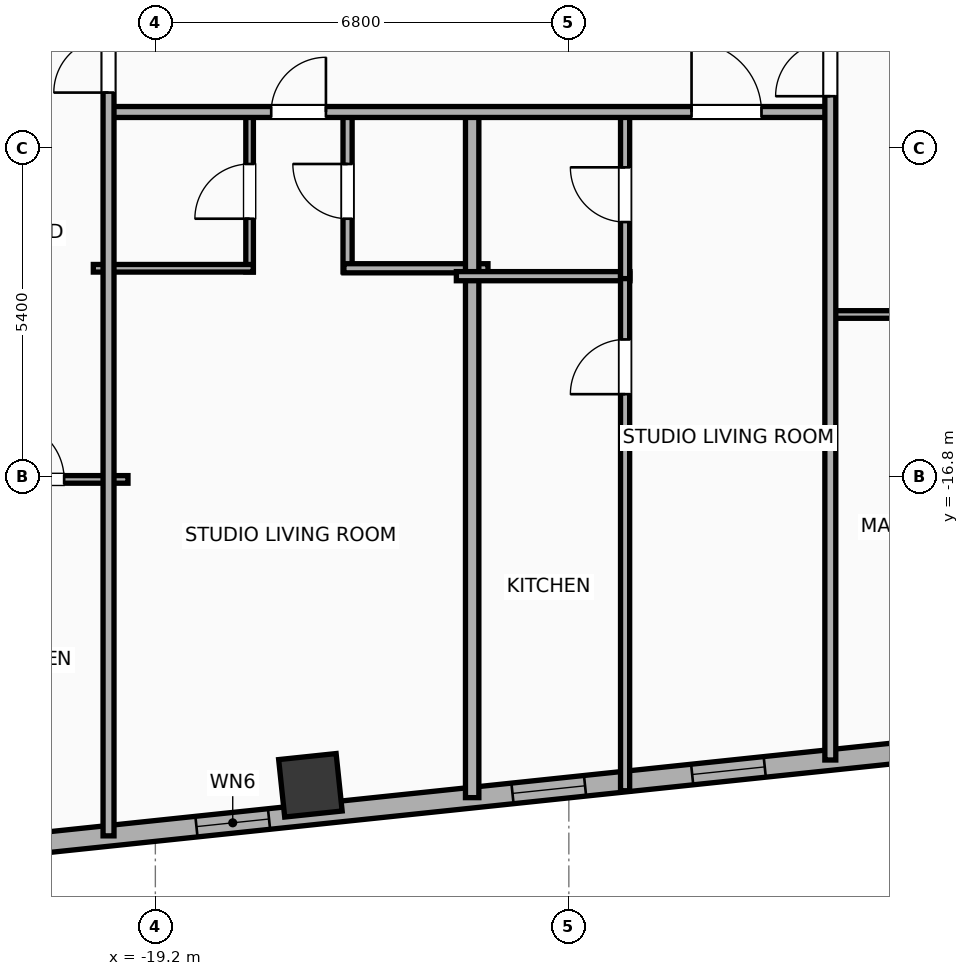
"""IFC4 building model, lengths in metres.
Left out: names, types, materials, properties, quantities, classifications, styles, units other than length and angle.
Written with IfcOpenShell. Run it as: python <this file> out.ifc"""

import sys

from ifc_helpers import new_model, si_unit, direction, frame, frame_2d, origin, origin_2d, place, context, subcontext, project, spatial, rectangle, hollow_rectangle, extrude, element, fill, save


model = new_model("IFC4")
c1 = context("Model", 3, precision=1e-05, world=origin(), true_north=direction((0.0, 1.0)))
c2 = subcontext(c1, "Body", "Model", "MODEL_VIEW")
j1 = project(units=[si_unit("LENGTHUNIT", "METRE"), si_unit("PLANEANGLEUNIT", "RADIAN")], contexts=[c1])
p1 = place(None, origin())
s1 = spatial("IfcSite", under=j1, at=p1, CompositionType="ELEMENT")
p2 = place(p1, origin())
s2 = spatial("IfcBuilding", under=s1, at=p2, CompositionType="ELEMENT")
p3 = place(p2, frame((0.0, 0.0, 175.5)))
s3 = spatial("IfcBuildingStorey", under=s2, at=p3, CompositionType="ELEMENT", Elevation=175.5)
p4 = place(p3, frame((-16.65, -21.873, 0.0), z_axis=(0.0, 0.0, 1.0), x_axis=(0.994521895368, 0.104528463268, 0.0)))
e1 = element("IfcColumn", 1, at=p4, inside=s3, PredefinedType="COLUMN", context=c2, shape_type="SweptSolid", body=[
    extrude(hollow_rectangle(XDim=0.95, YDim=0.95, WallThickness=0.032, at=origin_2d()), origin(), (0.0, 0.0, 1.0), 3.9),
])
p5 = place(p3, frame((24.756, -18.003, 0.0), z_axis=(0.0, 0.0, 1.0), x_axis=(-0.99452160744, -0.104531202687, 0.0)))
e2 = element("IfcWall", 2, at=p5, inside=s3, PredefinedType="ELEMENTEDWALL", context=c2, shape_type="SweptSolid", body=[
    extrude(rectangle(XDim=51.967, YDim=0.34, at=frame_2d((25.983, 0.0))), origin(), (0.0, 0.0, 1.0), 3.65),
])
p6 = place(p5, frame((25.633, 0.0, 0.75)))
e3 = element("IfcOpeningElement", 3, at=p6, cuts=e2, PredefinedType="OPENING", context=c2, shape_type="SweptSolid", body=[
    extrude(rectangle(XDim=2.4, YDim=2.1, at=frame_2d((1.2, 1.05))), frame((0.0, 0.18, 0.0), z_axis=(0.0, -1.0, 0.0), x_axis=(1.0, 0.0, 0.0)), (0.0, 0.0, 1.0), 0.36),
])
p7 = place(p5, frame((42.318, 0.0, 0.75)))
e4 = element("IfcOpeningElement", 4, at=p7, cuts=e2, PredefinedType="OPENING", context=c2, shape_type="SweptSolid", body=[
    extrude(rectangle(XDim=1.2, YDim=2.05, at=frame_2d((0.6, 1.025))), frame((0.0, 0.18, 0.0), z_axis=(0.0, -1.0, 0.0), x_axis=(1.0, 0.0, 0.0)), (0.0, 0.0, 1.0), 0.36),
])
p8 = place(p5, frame((34.121, 0.0, 0.75)))
e5 = element("IfcOpeningElement", 5, at=p8, cuts=e2, PredefinedType="OPENING", context=c2, shape_type="SweptSolid", body=[
    extrude(rectangle(XDim=1.2, YDim=2.05, at=frame_2d((0.6, 1.025))), frame((0.0, 0.18, 0.0), z_axis=(0.0, -1.0, 0.0), x_axis=(1.0, 0.0, 0.0)), (0.0, 0.0, 1.0), 0.36),
])
p9 = place(p5, frame((37.092, 0.0, 0.75)))
e6 = element("IfcOpeningElement", 6, at=p9, cuts=e2, PredefinedType="OPENING", context=c2, shape_type="SweptSolid", body=[
    extrude(rectangle(XDim=1.2, YDim=2.05, at=frame_2d((0.6, 1.025))), frame((0.0, 0.18, 0.0), z_axis=(0.0, -1.0, 0.0), x_axis=(1.0, 0.0, 0.0)), (0.0, 0.0, 1.0), 0.36),
])
p10 = place(p5, frame((14.359, 0.0, 0.75)))
e7 = element("IfcOpeningElement", 7, at=p10, cuts=e2, PredefinedType="OPENING", context=c2, shape_type="SweptSolid", body=[
    extrude(rectangle(XDim=1.2, YDim=2.05, at=frame_2d((0.6, 1.025))), frame((0.0, 0.18, 0.0), z_axis=(0.0, -1.0, 0.0), x_axis=(1.0, 0.0, 0.0)), (0.0, 0.0, 1.0), 0.36),
])
p11 = place(p5, frame((11.388, 0.0, 0.75)))
e8 = element("IfcOpeningElement", 8, at=p11, cuts=e2, PredefinedType="OPENING", context=c2, shape_type="SweptSolid", body=[
    extrude(rectangle(XDim=1.2, YDim=2.05, at=frame_2d((0.6, 1.025))), frame((0.0, 0.18, 0.0), z_axis=(0.0, -1.0, 0.0), x_axis=(1.0, 0.0, 0.0)), (0.0, 0.0, 1.0), 0.36),
])
p12 = place(p5, frame((8.332, 0.0, 0.75)))
e9 = element("IfcOpeningElement", 9, at=p12, cuts=e2, PredefinedType="OPENING", context=c2, shape_type="SweptSolid", body=[
    extrude(rectangle(XDim=1.2, YDim=2.05, at=frame_2d((0.6, 1.025))), frame((0.0, 0.18, 0.0), z_axis=(0.0, -1.0, 0.0), x_axis=(1.0, 0.0, 0.0)), (0.0, 0.0, 1.0), 0.36),
])
p13 = place(p5, frame((5.331, 0.0, 0.75)))
e10 = element("IfcOpeningElement", 10, at=p13, cuts=e2, PredefinedType="OPENING", context=c2, shape_type="SweptSolid", body=[
    extrude(rectangle(XDim=1.2, YDim=2.05, at=frame_2d((0.6, 1.025))), frame((0.0, 0.18, 0.0), z_axis=(0.0, -1.0, 0.0), x_axis=(1.0, 0.0, 0.0)), (0.0, 0.0, 1.0), 0.36),
])
p14 = place(p5, frame((29.313, 0.0, 0.75)))
e11 = element("IfcOpeningElement", 11, at=p14, cuts=e2, PredefinedType="OPENING", context=c2, shape_type="SweptSolid", body=[
    extrude(rectangle(XDim=1.2, YDim=2.05, at=frame_2d((0.6, 1.025))), frame((0.0, 0.18, 0.0), z_axis=(0.0, -1.0, 0.0), x_axis=(1.0, 0.0, 0.0)), (0.0, 0.0, 1.0), 0.36),
])
p15 = place(p5, frame((22.248, 0.0, 0.75)))
e12 = element("IfcOpeningElement", 12, at=p15, cuts=e2, PredefinedType="OPENING", context=c2, shape_type="SweptSolid", body=[
    extrude(rectangle(XDim=1.2, YDim=2.05, at=frame_2d((0.6, 1.025))), frame((0.0, 0.18, 0.0), z_axis=(0.0, -1.0, 0.0), x_axis=(1.0, 0.0, 0.0)), (0.0, 0.0, 1.0), 0.36),
])
p16 = place(p5, frame((18.186, 0.0, 0.75)))
e13 = element("IfcOpeningElement", 13, at=p16, cuts=e2, PredefinedType="OPENING", context=c2, shape_type="SweptSolid", body=[
    extrude(rectangle(XDim=1.2, YDim=2.05, at=frame_2d((0.6, 1.025))), frame((0.0, 0.18, 0.0), z_axis=(0.0, -1.0, 0.0), x_axis=(1.0, 0.0, 0.0)), (0.0, 0.0, 1.0), 0.36),
])
p17 = place(p5, frame((48.13, 0.0, 0.75)))
e14 = element("IfcOpeningElement", 14, at=p17, cuts=e2, PredefinedType="OPENING", context=c2, shape_type="SweptSolid", body=[
    extrude(rectangle(XDim=1.2, YDim=2.05, at=frame_2d((0.6, 1.025))), frame((0.0, 0.18, 0.0), z_axis=(0.0, -1.0, 0.0), x_axis=(1.0, 0.0, 0.0)), (0.0, 0.0, 1.0), 0.36),
])
p18 = place(p5, frame((50.09, 0.0, 0.75)))
e15 = element("IfcOpeningElement", 15, at=p18, cuts=e2, PredefinedType="OPENING", context=c2, shape_type="SweptSolid", body=[
    extrude(rectangle(XDim=1.2, YDim=2.05, at=frame_2d((0.6, 1.025))), frame((0.0, 0.18, 0.0), z_axis=(0.0, -1.0, 0.0), x_axis=(1.0, 0.0, 0.0)), (0.0, 0.0, 1.0), 0.36),
])
p19 = place(p5, frame((0.718, 0.0, 0.75)))
e16 = element("IfcOpeningElement", 16, at=p19, cuts=e2, PredefinedType="OPENING", context=c2, shape_type="SweptSolid", body=[
    extrude(rectangle(XDim=1.2, YDim=2.05, at=frame_2d((0.6, 1.025))), frame((0.0, 0.18, 0.0), z_axis=(0.0, -1.0, 0.0), x_axis=(1.0, 0.0, 0.0)), (0.0, 0.0, 1.0), 0.36),
])
p20 = place(p3, frame((-17.65, -13.43, 0.0), z_axis=(0.0, 0.0, 1.0), x_axis=(0.0, 1.0, 0.0)))
e17 = element("IfcWall", 17, at=p20, inside=s3, PredefinedType="PARTITIONING", context=c2, shape_type="SweptSolid", body=[
    extrude(rectangle(XDim=2.65, YDim=0.125, at=frame_2d((1.325, 0.0))), origin(), (0.0, 0.0, 1.0), 3.65),
])
p21 = place(p20, frame((0.875, 0.0, 0.0)))
e18 = element("IfcOpeningElement", 18, at=p21, cuts=e17, PredefinedType="OPENING", context=c2, shape_type="SweptSolid", body=[
    extrude(rectangle(XDim=0.9, YDim=2.05, at=frame_2d((0.45, 1.025))), frame((0.0, 0.073, 0.0), z_axis=(0.0, -1.0, 0.0), x_axis=(1.0, 0.0, 0.0)), (0.0, 0.0, 1.0), 0.145),
])
p22 = place(p3, frame((-16.039, -13.43, 0.0), z_axis=(0.0, 0.0, 1.0), x_axis=(0.0, 1.0, 0.0)))
e19 = element("IfcWall", 19, at=p22, inside=s3, PredefinedType="PLUMBINGWALL", context=c2, shape_type="SweptSolid", body=[
    extrude(rectangle(XDim=2.65, YDim=0.15, at=frame_2d((1.325, 0.0))), origin(), (0.0, 0.0, 1.0), 3.04),
])
p23 = place(p22, frame((0.875, 0.0, 0.0)))
e20 = element("IfcOpeningElement", 20, at=p23, cuts=e19, PredefinedType="OPENING", context=c2, shape_type="SweptSolid", body=[
    extrude(rectangle(XDim=0.9, YDim=2.05, at=frame_2d((0.45, 1.025))), frame((0.0, 0.085, 0.0), z_axis=(0.0, -1.0, 0.0), x_axis=(1.0, 0.0, 0.0)), (0.0, 0.0, 1.0), 0.17),
])
p24 = place(p3, frame((-20.22, -13.37, 0.0), z_axis=(0.0, 0.0, 1.0), x_axis=(1.0, 0.0, 0.0)))
e21 = element("IfcWall", 21, at=p24, inside=s3, PredefinedType="PARTITIONING", context=c2, shape_type="SweptSolid", body=[
    extrude(rectangle(XDim=2.63, YDim=0.125, at=frame_2d((1.315, 0.0))), origin(), (0.0, 0.0, 1.0), 3.65),
])
p25 = place(p3, frame((-16.099, -13.37, 0.0), z_axis=(0.0, 0.0, 1.0), x_axis=(1.0, 0.0, 0.0)))
e22 = element("IfcWall", 22, at=p25, inside=s3, PredefinedType="PLUMBINGWALL", context=c2, shape_type="SweptSolid", body=[
    extrude(rectangle(XDim=2.369, YDim=0.15, at=frame_2d((1.185, 0.0))), origin(), (0.0, 0.0, 1.0), 3.65),
])
p26 = place(p3, frame((-13.99, -22.075, 0.0), z_axis=(0.0, 0.0, 1.0), x_axis=(0.0, 1.0, 0.0)))
e23 = element("IfcWall", 23, at=p26, inside=s3, PredefinedType="PARTITIONING", context=c2, shape_type="SweptSolid", body=[
    extrude(rectangle(XDim=11.355, YDim=0.22, at=frame_2d((5.678, 0.0))), origin(), (0.0, 0.0, 1.0), 3.65),
])
p27 = place(p3, frame((-14.25, -13.5, 0.0), z_axis=(0.0, 0.0, 1.0), x_axis=(1.0, 0.0, 0.0)))
e24 = element("IfcWall", 24, at=p27, inside=s3, PredefinedType="PLUMBINGWALL", context=c2, shape_type="SweptSolid", body=[
    extrude(rectangle(XDim=2.855, YDim=0.15, at=frame_2d((1.427, 0.0))), origin(), (0.0, 0.0, 1.0), 3.65),
])
p28 = place(p3, frame((-11.475, -21.962, 0.0), z_axis=(0.0, 0.0, 1.0), x_axis=(0.0, 1.0, 0.0)))
e25 = element("IfcWall", 25, at=p28, inside=s3, PredefinedType="PLUMBINGWALL", context=c2, shape_type="SweptSolid", body=[
    extrude(rectangle(XDim=8.502, YDim=0.15, at=frame_2d((4.251, 0.0))), origin(), (0.0, 0.0, 1.0), 3.65),
])
p29 = place(p28, frame((6.521, 0.0, 0.0)))
e26 = element("IfcOpeningElement", 26, at=p29, cuts=e25, PredefinedType="OPENING", context=c2, shape_type="SweptSolid", body=[
    extrude(rectangle(XDim=0.9, YDim=2.05, at=frame_2d((0.45, 1.025))), frame((0.0, 0.085, 0.0), z_axis=(0.0, -1.0, 0.0), x_axis=(1.0, 0.0, 0.0)), (0.0, 0.0, 1.0), 0.17),
])
p30 = place(p3, frame((-11.475, -13.54, 0.0), z_axis=(0.0, 0.0, 1.0), x_axis=(0.0, 1.0, 0.0)))
e27 = element("IfcWall", 27, at=p30, inside=s3, PredefinedType="PLUMBINGWALL", context=c2, shape_type="SweptSolid", body=[
    extrude(rectangle(XDim=2.76, YDim=0.15, at=frame_2d((1.38, 0.0))), origin(), (0.0, 0.0, 1.0), 3.65),
])
p31 = place(p30, frame((0.93, 0.0, 0.0)))
e28 = element("IfcOpeningElement", 28, at=p31, cuts=e27, PredefinedType="OPENING", context=c2, shape_type="SweptSolid", body=[
    extrude(rectangle(XDim=0.9, YDim=2.05, at=frame_2d((0.45, 1.025))), frame((0.0, 0.085, 0.0), z_axis=(0.0, -1.0, 0.0), x_axis=(1.0, 0.0, 0.0)), (0.0, 0.0, 1.0), 0.17),
])
p32 = place(p3, frame((-20.0, -10.8, 0.0), z_axis=(0.0, 0.0, 1.0), x_axis=(1.0, 0.0, 0.0)))
e29 = element("IfcWall", 29, at=p32, inside=s3, PredefinedType="PARTITIONING", context=c2, shape_type="SweptSolid", body=[
    extrude(rectangle(XDim=11.92, YDim=0.18, at=frame_2d((5.96, 0.0))), origin(), (0.0, 0.0, 1.0), 3.65),
])
p33 = place(p32, frame((2.705, 0.0, 0.0)))
e30 = element("IfcOpeningElement", 30, at=p33, cuts=e29, PredefinedType="OPENING", context=c2, shape_type="SweptSolid", body=[
    extrude(rectangle(XDim=0.9, YDim=2.05, at=frame_2d((0.45, 1.025))), frame((0.0, 0.1, 0.0), z_axis=(0.0, -1.0, 0.0), x_axis=(1.0, 0.0, 0.0)), (0.0, 0.0, 1.0), 0.2),
])
p34 = place(p32, frame((9.618, 0.0, 0.0)))
e31 = element("IfcOpeningElement", 31, at=p34, cuts=e29, PredefinedType="OPENING", context=c2, shape_type="SweptSolid", body=[
    extrude(rectangle(XDim=1.15, YDim=2.05, at=frame_2d((0.575, 1.025))), frame((0.0, 0.1, 0.0), z_axis=(0.0, -1.0, 0.0), x_axis=(1.0, 0.0, 0.0)), (0.0, 0.0, 1.0), 0.2),
])
p35 = place(p3, frame((-8.08, -14.13, 0.0), z_axis=(0.0, 0.0, 1.0), x_axis=(1.0, 0.0, 0.0)))
e32 = element("IfcWall", 32, at=p35, inside=s3, PredefinedType="PARTITIONING", context=c2, shape_type="SweptSolid", body=[
    extrude(rectangle(XDim=8.06, YDim=0.125, at=frame_2d((4.03, 0.0))), origin(), (0.0, 0.0, 1.0), 3.65),
])
p36 = place(p35, frame((1.323, 0.0, 0.0)))
e33 = element("IfcOpeningElement", 33, at=p36, cuts=e32, PredefinedType="OPENING", context=c2, shape_type="SweptSolid", body=[
    extrude(rectangle(XDim=0.9, YDim=2.05, at=frame_2d((0.45, 1.025))), frame((0.0, 0.073, 0.0), z_axis=(0.0, -1.0, 0.0), x_axis=(1.0, 0.0, 0.0)), (0.0, 0.0, 1.0), 0.145),
])
p37 = place(p35, frame((4.547, 0.0, 0.0)))
e34 = element("IfcOpeningElement", 34, at=p37, cuts=e32, PredefinedType="OPENING", context=c2, shape_type="SweptSolid", body=[
    extrude(rectangle(XDim=0.9, YDim=2.05, at=frame_2d((0.45, 1.025))), frame((0.0, 0.073, 0.0), z_axis=(0.0, -1.0, 0.0), x_axis=(1.0, 0.0, 0.0)), (0.0, 0.0, 1.0), 0.145),
])
p38 = place(p3, frame((-8.1, -21.456, 0.0), z_axis=(0.0, 0.0, 1.0), x_axis=(0.0, 1.0, 0.0)))
e35 = element("IfcWall", 35, at=p38, inside=s3, PredefinedType="PARTITIONING", context=c2, shape_type="SweptSolid", body=[
    extrude(rectangle(XDim=12.166, YDim=0.18, at=frame_2d((6.083, 0.0))), origin(), (0.0, 0.0, 1.0), 3.65),
])
p39 = place(p38, frame((10.916, 0.0, 0.0)))
e36 = element("IfcOpeningElement", 36, at=p39, cuts=e35, PredefinedType="OPENING", context=c2, shape_type="SweptSolid", body=[
    extrude(rectangle(XDim=0.9, YDim=2.05, at=frame_2d((0.45, 1.025))), frame((0.0, 0.1, 0.0), z_axis=(0.0, -1.0, 0.0), x_axis=(1.0, 0.0, 0.0)), (0.0, 0.0, 1.0), 0.2),
])
p40 = place(p3, frame((-22.7, -16.842, 0.0), z_axis=(0.0, 0.0, 1.0), x_axis=(1.0, 0.0, 0.0)))
e37 = element("IfcWall", 37, at=p40, inside=s3, PredefinedType="PARTITIONING", context=c2, shape_type="SweptSolid", body=[
    extrude(rectangle(XDim=3.05, YDim=0.125, at=frame_2d((1.525, 0.0))), origin(), (0.0, 0.0, 1.0), 3.65),
])
p41 = place(p40, frame((1.05, 0.0, 0.0)))
e38 = element("IfcOpeningElement", 38, at=p41, cuts=e37, PredefinedType="OPENING", context=c2, shape_type="SweptSolid", body=[
    extrude(rectangle(XDim=0.95, YDim=2.05, at=frame_2d((0.475, 1.025))), frame((0.0, 0.073, 0.0), z_axis=(0.0, -1.0, 0.0), x_axis=(1.0, 0.0, 0.0)), (0.0, 0.0, 1.0), 0.145),
])
p42 = place(p3, frame((-19.97, -22.704, 0.0), z_axis=(0.0, 0.0, 1.0), x_axis=(0.0, 1.0, 0.0)))
e39 = element("IfcWall", 39, at=p42, inside=s3, PredefinedType="PARTITIONING", context=c2, shape_type="SweptSolid", body=[
    extrude(rectangle(XDim=24.704, YDim=0.18, at=frame_2d((12.352, 0.0))), origin(), (0.0, 0.0, 1.0), 3.65),
])
p43 = place(p42, frame((12.223, 0.0, 0.0)))
e40 = element("IfcOpeningElement", 40, at=p43, cuts=e39, PredefinedType="OPENING", context=c2, shape_type="SweptSolid", body=[
    extrude(rectangle(XDim=0.9, YDim=2.05, at=frame_2d((0.45, 1.025))), frame((0.0, 0.1, 0.0), z_axis=(0.0, -1.0, 0.0), x_axis=(1.0, 0.0, 0.0)), (0.0, 0.0, 1.0), 0.2),
])
p44 = place(p7, origin())
e41 = element("IfcWindow", 41, at=p44, inside=s3, PartitioningType="SINGLE_PANEL", PredefinedType="WINDOW", context=c2, shape_type="SweptSolid", body=[
    extrude(rectangle(XDim=1.2, YDim=2.05, at=frame_2d((0.6, 1.025))), frame((0.0, 0.03, 0.0), z_axis=(0.0, -1.0, 0.0), x_axis=(1.0, 0.0, 0.0)), (0.0, 0.0, 1.0), 0.06),
])
fill(e4, e41)
p45 = place(p8, origin())
e42 = element("IfcWindow", 42, at=p45, inside=s3, PartitioningType="SINGLE_PANEL", PredefinedType="WINDOW", context=c2, shape_type="SweptSolid", body=[
    extrude(rectangle(XDim=1.2, YDim=2.05, at=frame_2d((0.6, 1.025))), frame((0.0, 0.03, 0.0), z_axis=(0.0, -1.0, 0.0), x_axis=(1.0, 0.0, 0.0)), (0.0, 0.0, 1.0), 0.06),
])
fill(e5, e42)
p46 = place(p9, origin())
e43 = element("IfcWindow", 43, at=p46, inside=s3, PartitioningType="SINGLE_PANEL", PredefinedType="WINDOW", context=c2, shape_type="SweptSolid", body=[
    extrude(rectangle(XDim=1.2, YDim=2.05, at=frame_2d((0.6, 1.025))), frame((0.0, 0.03, 0.0), z_axis=(0.0, -1.0, 0.0), x_axis=(1.0, 0.0, 0.0)), (0.0, 0.0, 1.0), 0.06),
])
fill(e6, e43)
p47 = place(p21, origin())
e44 = element("IfcDoor", 44, at=p47, inside=s3, OperationType="SINGLE_SWING_LEFT", PredefinedType="DOOR", context=c2, shape_type="SweptSolid", body=[
    extrude(rectangle(XDim=0.9, YDim=2.05, at=frame_2d((0.45, 1.025))), frame((0.0, 0.025, 0.0), z_axis=(0.0, -1.0, 0.0), x_axis=(1.0, 0.0, 0.0)), (0.0, 0.0, 1.0), 0.05),
])
fill(e18, e44)
p48 = place(p23, origin())
e45 = element("IfcDoor", 45, at=p48, inside=s3, OperationType="SINGLE_SWING_RIGHT", PredefinedType="DOOR", context=c2, shape_type="SweptSolid", body=[
    extrude(rectangle(XDim=0.9, YDim=2.05, at=frame_2d((0.45, 1.025))), frame((0.0, 0.025, 0.0), z_axis=(0.0, -1.0, 0.0), x_axis=(1.0, 0.0, 0.0)), (0.0, 0.0, 1.0), 0.05),
])
fill(e20, e45)
p49 = place(p29, origin())
e46 = element("IfcDoor", 46, at=p49, inside=s3, OperationType="SINGLE_SWING_LEFT", PredefinedType="DOOR", context=c2, shape_type="SweptSolid", body=[
    extrude(rectangle(XDim=0.9, YDim=2.05, at=frame_2d((0.45, 1.025))), frame((0.0, 0.025, 0.0), z_axis=(0.0, -1.0, 0.0), x_axis=(1.0, 0.0, 0.0)), (0.0, 0.0, 1.0), 0.05),
])
fill(e26, e46)
p50 = place(p31, origin())
e47 = element("IfcDoor", 47, at=p50, inside=s3, OperationType="SINGLE_SWING_RIGHT", PredefinedType="DOOR", context=c2, shape_type="SweptSolid", body=[
    extrude(rectangle(XDim=0.9, YDim=2.05, at=frame_2d((0.45, 1.025))), frame((0.0, 0.025, 0.0), z_axis=(0.0, -1.0, 0.0), x_axis=(1.0, 0.0, 0.0)), (0.0, 0.0, 1.0), 0.05),
])
fill(e28, e47)
p51 = place(p33, origin())
e48 = element("IfcDoor", 48, at=p51, inside=s3, OperationType="SINGLE_SWING_RIGHT", PredefinedType="DOOR", context=c2, shape_type="SweptSolid", body=[
    extrude(rectangle(XDim=0.9, YDim=2.05, at=frame_2d((0.45, 1.025))), frame((0.0, 0.025, 0.0), z_axis=(0.0, -1.0, 0.0), x_axis=(1.0, 0.0, 0.0)), (0.0, 0.0, 1.0), 0.05),
])
fill(e30, e48)
p52 = place(p34, origin())
e49 = element("IfcDoor", 49, at=p52, inside=s3, OperationType="SINGLE_SWING_LEFT", PredefinedType="DOOR", context=c2, shape_type="SweptSolid", body=[
    extrude(rectangle(XDim=1.15, YDim=2.05, at=frame_2d((0.575, 1.025))), frame((0.0, 0.025, 0.0), z_axis=(0.0, -1.0, 0.0), x_axis=(1.0, 0.0, 0.0)), (0.0, 0.0, 1.0), 0.05),
])
fill(e31, e49)
p53 = place(p39, origin())
e50 = element("IfcDoor", 50, at=p53, inside=s3, OperationType="SINGLE_SWING_LEFT", PredefinedType="DOOR", context=c2, shape_type="SweptSolid", body=[
    extrude(rectangle(XDim=0.9, YDim=2.05, at=frame_2d((0.45, 1.025))), frame((0.0, 0.025, 0.0), z_axis=(0.0, -1.0, 0.0), x_axis=(1.0, 0.0, 0.0)), (0.0, 0.0, 1.0), 0.05),
])
fill(e36, e50)
p54 = place(p41, origin())
e51 = element("IfcDoor", 51, at=p54, inside=s3, OperationType="SINGLE_SWING_LEFT", PredefinedType="DOOR", context=c2, shape_type="SweptSolid", body=[
    extrude(rectangle(XDim=0.95, YDim=2.05, at=frame_2d((0.475, 1.025))), frame((0.0, 0.025, 0.0), z_axis=(0.0, -1.0, 0.0), x_axis=(1.0, 0.0, 0.0)), (0.0, 0.0, 1.0), 0.05),
])
fill(e38, e51)
p55 = place(p43, origin())
e52 = element("IfcDoor", 52, at=p55, inside=s3, OperationType="SINGLE_SWING_LEFT", PredefinedType="DOOR", context=c2, shape_type="SweptSolid", body=[
    extrude(rectangle(XDim=0.9, YDim=2.05, at=frame_2d((0.45, 1.025))), frame((0.0, 0.025, 0.0), z_axis=(0.0, -1.0, 0.0), x_axis=(1.0, 0.0, 0.0)), (0.0, 0.0, 1.0), 0.05),
])
fill(e40, e52)
save(model, sys.argv[1])
